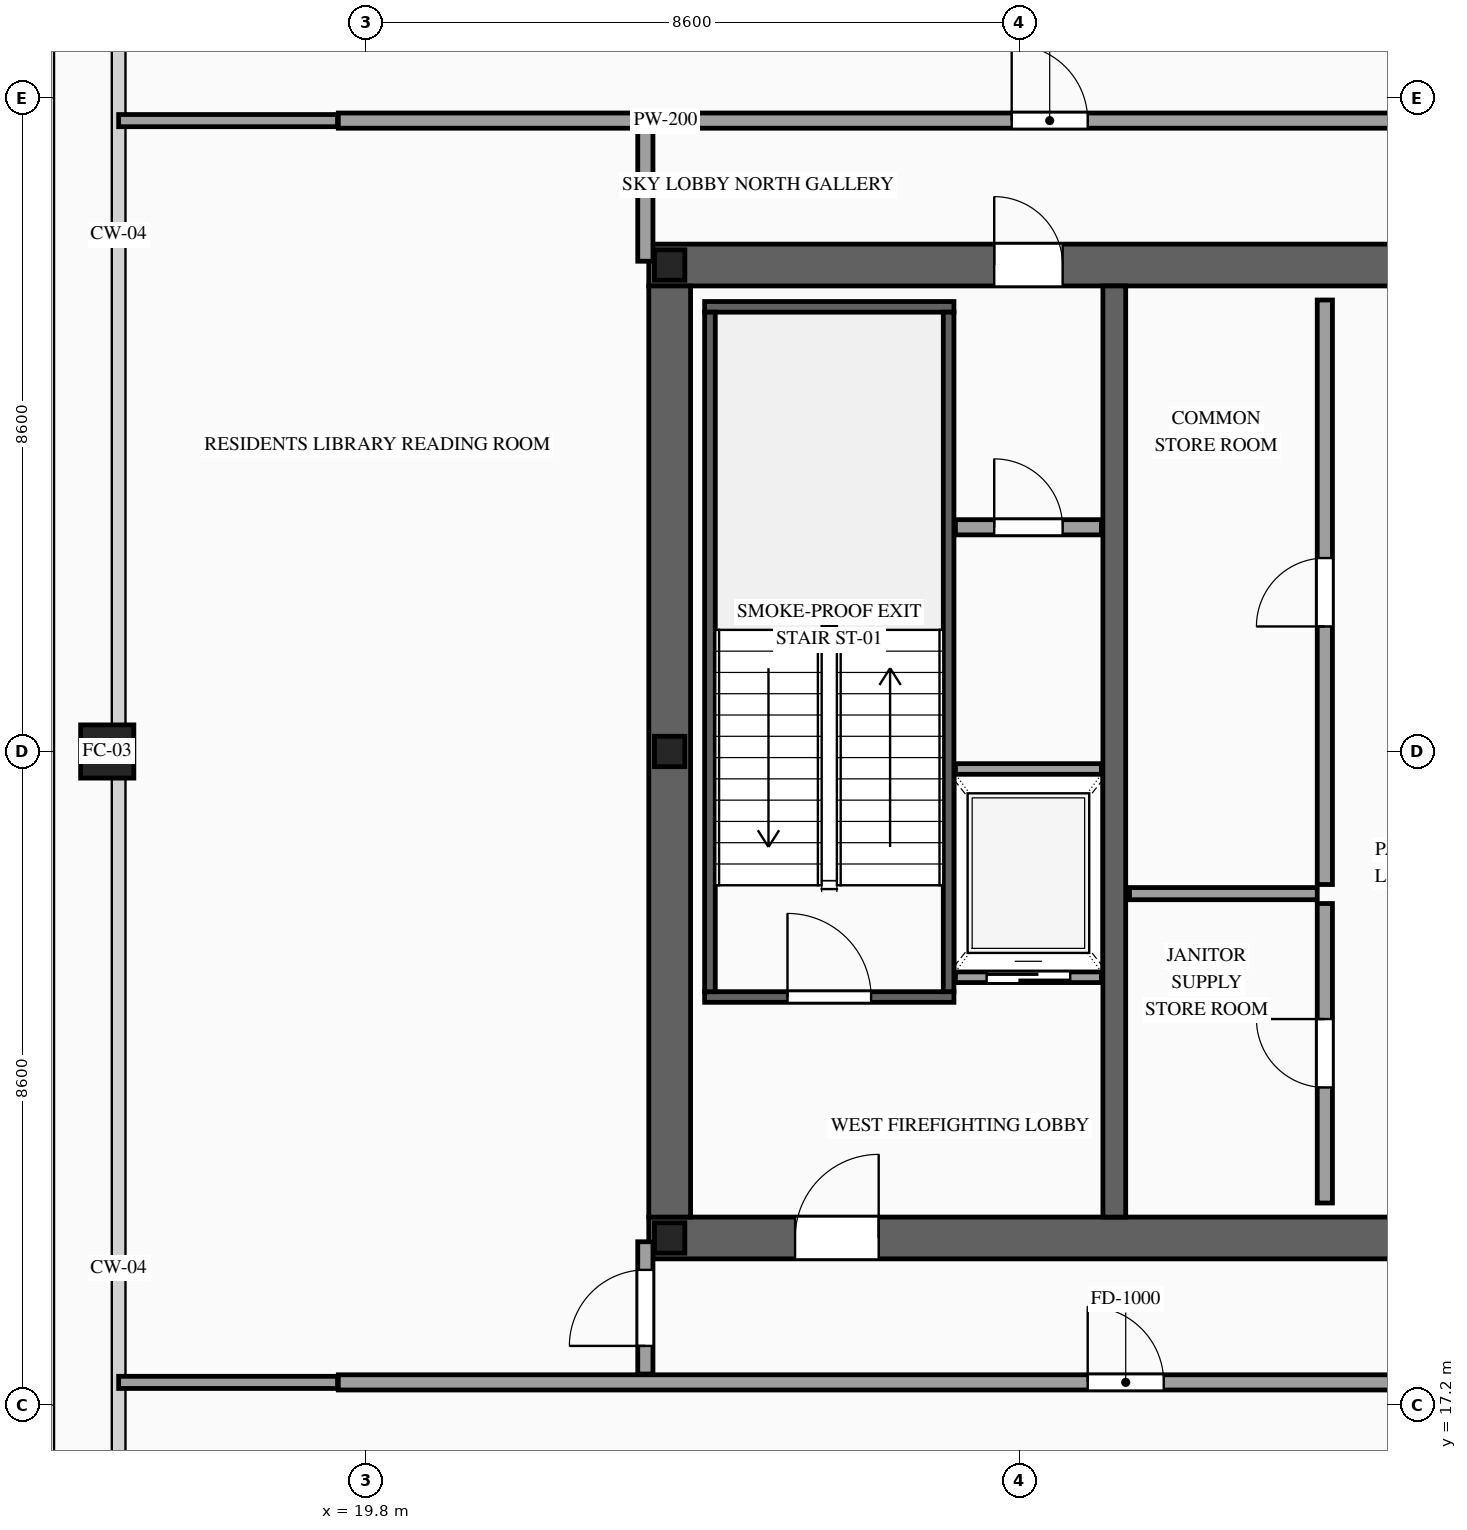
"""IFC4 building model, lengths in metres.
Left out: names, types, materials, properties, quantities, classifications, styles, units other than length and angle.
Written with IfcOpenShell. Run it as: python <this file> out.ifc"""

import sys

from ifc_helpers import new_model, si_unit, direction, frame, frame_2d, origin, origin_2d, place, context, subcontext, project, spatial, rectangle, hollow_rectangle, i_section, extrude, source, transform, mapped, element, fill, save


model = new_model("IFC4")
c1 = context("Model", 3, precision=1e-05, world=origin(), true_north=direction((0.0, 1.0)))
c2 = subcontext(c1, "Body", "Model", "MODEL_VIEW")
j1 = project(units=[si_unit("LENGTHUNIT", "METRE"), si_unit("PLANEANGLEUNIT", "RADIAN")], contexts=[c1])
p1 = place(None, origin())
s1 = spatial("IfcSite", under=j1, at=p1, CompositionType="ELEMENT")
p2 = place(p1, origin())
s2 = spatial("IfcBuilding", under=s1, at=p2, CompositionType="ELEMENT")
p3 = place(p2, frame((0.0, 0.0, 259.1)))
s3 = spatial("IfcBuildingStorey", under=s2, at=p3, CompositionType="ELEMENT", Elevation=259.1)
p4 = place(p3, frame((23.525, 19.4, 0.0), z_axis=(0.0, 0.0, 1.0), x_axis=(1.0, 0.0, 0.0)))
e1 = element("IfcWall", 1, at=p4, inside=s3, PredefinedType="SHEAR", context=c2, shape_type="SweptSolid", body=[
    extrude(rectangle(XDim=26.95, YDim=0.55, at=frame_2d((13.475, 0.0))), origin(), (0.0, 0.0, 1.0), 4.4),
])
p5 = place(p4, frame((1.925, 0.0, 0.0)))
e2 = element("IfcOpeningElement", 2, at=p5, cuts=e1, PredefinedType="OPENING", context=c2, shape_type="SweptSolid", body=[
    extrude(rectangle(XDim=1.1, YDim=2.2, at=frame_2d((0.55, 1.1))), frame((0.0, 0.29, 0.0), z_axis=(0.0, -1.0, 0.0), x_axis=(1.0, 0.0, 0.0)), (0.0, 0.0, 1.0), 0.58),
])
p6 = place(p4, frame((9.825, 0.0, 0.0)))
e3 = element("IfcOpeningElement", 3, at=p6, cuts=e1, PredefinedType="OPENING", context=c2, shape_type="SweptSolid", body=[
    extrude(rectangle(XDim=1.1, YDim=2.2, at=frame_2d((0.55, 1.1))), frame((0.0, 0.29, 0.0), z_axis=(0.0, -1.0, 0.0), x_axis=(1.0, 0.0, 0.0)), (0.0, 0.0, 1.0), 0.58),
])
p7 = place(p4, frame((23.025, 0.0, 0.0)))
e4 = element("IfcOpeningElement", 4, at=p7, cuts=e1, PredefinedType="OPENING", context=c2, shape_type="SweptSolid", body=[
    extrude(rectangle(XDim=1.1, YDim=2.2, at=frame_2d((0.55, 1.1))), frame((0.0, 0.29, 0.0), z_axis=(0.0, -1.0, 0.0), x_axis=(1.0, 0.0, 0.0)), (0.0, 0.0, 1.0), 0.58),
])
p8 = place(p4, frame((19.645, 0.0, 0.0)))
e5 = element("IfcOpeningElement", 5, at=p8, cuts=e1, PredefinedType="OPENING", context=c2, shape_type="SweptSolid", body=[
    extrude(rectangle(XDim=0.9, YDim=2.15, at=frame_2d((0.45, 1.075))), frame((0.0, 0.29, 0.0), z_axis=(0.0, -1.0, 0.0), x_axis=(1.0, 0.0, 0.0)), (0.0, 0.0, 1.0), 0.58),
])
p9 = place(p4, frame((18.205, 0.0, 0.0)))
e6 = element("IfcOpeningElement", 6, at=p9, cuts=e1, PredefinedType="OPENING", context=c2, shape_type="SweptSolid", body=[
    extrude(rectangle(XDim=0.9, YDim=2.15, at=frame_2d((0.45, 1.075))), frame((0.0, 0.29, 0.0), z_axis=(0.0, -1.0, 0.0), x_axis=(1.0, 0.0, 0.0)), (0.0, 0.0, 1.0), 0.58),
])
p10 = place(p3, frame((23.525, 32.2, 0.0), z_axis=(0.0, 0.0, 1.0), x_axis=(1.0, 0.0, 0.0)))
e7 = element("IfcWall", 7, at=p10, inside=s3, PredefinedType="SHEAR", context=c2, shape_type="SweptSolid", body=[
    extrude(rectangle(XDim=26.95, YDim=0.55, at=frame_2d((13.475, 0.0))), origin(), (0.0, 0.0, 1.0), 4.4),
])
p11 = place(p10, frame((4.545, 0.0, 0.0)))
e8 = element("IfcOpeningElement", 8, at=p11, cuts=e7, PredefinedType="OPENING", context=c2, shape_type="SweptSolid", body=[
    extrude(rectangle(XDim=0.9, YDim=2.15, at=frame_2d((0.45, 1.075))), frame((0.0, 0.29, 0.0), z_axis=(0.0, -1.0, 0.0), x_axis=(1.0, 0.0, 0.0)), (0.0, 0.0, 1.0), 0.58),
])
p12 = place(p10, frame((9.825, 0.0, 0.0)))
e9 = element("IfcOpeningElement", 9, at=p12, cuts=e7, PredefinedType="OPENING", context=c2, shape_type="SweptSolid", body=[
    extrude(rectangle(XDim=1.1, YDim=2.2, at=frame_2d((0.55, 1.1))), frame((0.0, 0.29, 0.0), z_axis=(0.0, -1.0, 0.0), x_axis=(1.0, 0.0, 0.0)), (0.0, 0.0, 1.0), 0.58),
])
p13 = place(p10, frame((15.675, 0.0, 0.0)))
e10 = element("IfcOpeningElement", 10, at=p13, cuts=e7, PredefinedType="OPENING", context=c2, shape_type="SweptSolid", body=[
    extrude(rectangle(XDim=1.1, YDim=2.2, at=frame_2d((0.55, 1.1))), frame((0.0, 0.29, 0.0), z_axis=(0.0, -1.0, 0.0), x_axis=(1.0, 0.0, 0.0)), (0.0, 0.0, 1.0), 0.58),
])
p14 = place(p10, frame((18.775, 0.0, 0.0)))
e11 = element("IfcOpeningElement", 11, at=p14, cuts=e7, PredefinedType="OPENING", context=c2, shape_type="SweptSolid", body=[
    extrude(rectangle(XDim=1.1, YDim=2.2, at=frame_2d((0.55, 1.1))), frame((0.0, 0.29, 0.0), z_axis=(0.0, -1.0, 0.0), x_axis=(1.0, 0.0, 0.0)), (0.0, 0.0, 1.0), 0.58),
])
m1 = source(origin(), c2, "Body", "SweptSolid", [
    extrude(rectangle(XDim=12.25, YDim=0.55, at=frame_2d((6.125, 0.0))), origin(), (0.0, 0.0, 1.0), 4.4),
])
p15 = place(p3, frame((23.8, 19.675, 0.0), z_axis=(0.0, 0.0, 1.0), x_axis=(0.0, 1.0, 0.0)))
e12 = element("IfcWall", 12, at=p15, inside=s3, PredefinedType="SHEAR", context=c2, shape_type="MappedRepresentation", body=[
    mapped(m1, transform((0.0, 0.0, 0.0), scale=1.0)),
])
m2 = source(origin(), c2, "Body", "SweptSolid", [
    extrude(rectangle(XDim=12.25, YDim=0.3, at=frame_2d((6.125, 0.0))), origin(), (0.0, 0.0, 1.0), 4.4),
])
p16 = place(p3, frame((29.65, 19.675, 0.0), z_axis=(0.0, 0.0, 1.0), x_axis=(0.0, 1.0, 0.0)))
e13 = element("IfcWall", 13, at=p16, inside=s3, PredefinedType="SOLIDWALL", context=c2, shape_type="MappedRepresentation", body=[
    mapped(m2, transform((0.0, 0.0, 0.0), scale=1.0)),
])
m3 = source(origin(), c2, "Body", "SweptSolid", [
    extrude(i_section(OverallWidth=0.4, OverallDepth=0.4, WebThickness=0.013, FlangeThickness=0.021, at=origin_2d()), origin(), (0.0, 0.0, 1.0), 4.4),
])
for number, where, z_axis, x_axis in (
    (14, (23.8, 19.4, 0.0), (0.0, 0.0, 1.0), (1.0, 0.0, 0.0)),
    (15, (23.8, 25.8, 0.0), (0.0, 0.0, 1.0), (1.0, 0.0, 0.0)),
    (16, (23.8, 32.2, 0.0), (0.0, 0.0, 1.0), (1.0, 0.0, 0.0)),
):
    element("IfcColumn", number, at=place(p3, frame(where, z_axis=z_axis, x_axis=x_axis)), inside=s3, PredefinedType="COLUMN", context=c2, shape_type="MappedRepresentation", body=[
        mapped(m3, transform((0.0, 0.0, 0.0), scale=1.0)),
    ])
m4 = source(origin(), c2, "Body", "SweptSolid", [
    extrude(hollow_rectangle(XDim=0.7, YDim=0.7, WallThickness=0.032, at=origin_2d()), origin(), (0.0, 0.0, 1.0), 4.4),
])
p17 = place(p3, frame((16.4, 25.8, 0.0), z_axis=(0.0, 0.0, 1.0), x_axis=(1.0, 0.0, 0.0)))
e17 = element("IfcColumn", 17, at=p17, inside=s3, PredefinedType="COLUMN", context=c2, shape_type="MappedRepresentation", body=[
    mapped(m4, transform((0.0, 0.0, 0.0), scale=1.0)),
])
p18 = place(p3, frame((27.56, 22.83, 0.0), z_axis=(0.0, 0.0, 1.0), x_axis=(1.0, 0.0, 0.0)))
e18 = element("IfcWall", 18, at=p18, inside=s3, PredefinedType="SOLIDWALL", context=c2, shape_type="SweptSolid", body=[
    extrude(rectangle(XDim=1.92, YDim=0.14, at=frame_2d((0.96, 0.0))), origin(), (0.0, 0.0, 1.0), 4.12),
])
p19 = place(p18, frame((0.41, 0.0, 0.0)))
e19 = element("IfcOpeningElement", 19, at=p19, cuts=e18, PredefinedType="OPENING", context=c2, shape_type="SweptSolid", body=[
    extrude(rectangle(XDim=1.1, YDim=2.2, at=frame_2d((0.55, 1.1))), frame((0.0, 0.085, 0.0), z_axis=(0.0, -1.0, 0.0), x_axis=(1.0, 0.0, 0.0)), (0.0, 0.0, 1.0), 0.17),
])
m5 = source(origin(), c2, "Body", "SweptSolid", [
    extrude(rectangle(XDim=1.92, YDim=0.14, at=frame_2d((0.96, 0.0))), origin(), (0.0, 0.0, 1.0), 4.12),
])
p20 = place(p3, frame((27.56, 25.57, 0.0), z_axis=(0.0, 0.0, 1.0), x_axis=(1.0, 0.0, 0.0)))
e20 = element("IfcWall", 20, at=p20, inside=s3, PredefinedType="SOLIDWALL", context=c2, shape_type="MappedRepresentation", body=[
    mapped(m5, transform((0.0, 0.0, 0.0), scale=1.0)),
])
p21 = place(p3, frame((24.26, 22.57, 0.0), z_axis=(0.0, 0.0, 1.0), x_axis=(1.0, 0.0, 0.0)))
e21 = element("IfcWall", 21, at=p21, inside=s3, PredefinedType="SOLIDWALL", context=c2, shape_type="SweptSolid", body=[
    extrude(rectangle(XDim=3.28, YDim=0.14, at=frame_2d((1.64, 0.0))), origin(), (0.0, 0.0, 1.0), 4.12),
])
p22 = place(p21, frame((1.09, 0.0, 0.0)))
e22 = element("IfcOpeningElement", 22, at=p22, cuts=e21, PredefinedType="OPENING", context=c2, shape_type="SweptSolid", body=[
    extrude(rectangle(XDim=1.1, YDim=2.2, at=frame_2d((0.55, 1.1))), frame((0.0, 0.085, 0.0), z_axis=(0.0, -1.0, 0.0), x_axis=(1.0, 0.0, 0.0)), (0.0, 0.0, 1.0), 0.17),
])
m6 = source(origin(), c2, "Body", "SweptSolid", [
    extrude(rectangle(XDim=3.28, YDim=0.14, at=frame_2d((1.64, 0.0))), origin(), (0.0, 0.0, 1.0), 4.12),
])
p23 = place(p3, frame((24.26, 31.65, 0.0), z_axis=(0.0, 0.0, 1.0), x_axis=(1.0, 0.0, 0.0)))
e23 = element("IfcWall", 23, at=p23, inside=s3, PredefinedType="SOLIDWALL", context=c2, shape_type="MappedRepresentation", body=[
    mapped(m6, transform((0.0, 0.0, 0.0), scale=1.0)),
])
m7 = source(origin(), c2, "Body", "SweptSolid", [
    extrude(rectangle(XDim=8.94, YDim=0.14, at=frame_2d((4.47, 0.0))), origin(), (0.0, 0.0, 1.0), 4.12),
])
for number, where, z_axis, x_axis in (
    (24, (24.33, 22.64, 0.0), (0.0, 0.0, 1.0), (0.0, 1.0, 0.0)),
    (25, (27.47, 22.64, 0.0), (0.0, 0.0, 1.0), (0.0, 1.0, 0.0)),
):
    element("IfcWall", number, at=place(p3, frame(where, z_axis=z_axis, x_axis=x_axis)), inside=s3, PredefinedType="SOLIDWALL", context=c2, shape_type="MappedRepresentation", body=[
        mapped(m7, transform((0.0, 0.0, 0.0), scale=1.0)),
    ])
p24 = place(p3, frame((27.56, 28.75, 0.0), z_axis=(0.0, 0.0, 1.0), x_axis=(1.0, 0.0, 0.0)))
e26 = element("IfcWall", 26, at=p24, inside=s3, PredefinedType="PARTITIONING", context=c2, shape_type="SweptSolid", body=[
    extrude(rectangle(XDim=1.92, YDim=0.2, at=frame_2d((0.96, 0.0))), origin(), (0.0, 0.0, 1.0), 4.12),
])
p25 = place(p24, frame((0.51, 0.0, 0.0)))
e27 = element("IfcOpeningElement", 27, at=p25, cuts=e26, PredefinedType="OPENING", context=c2, shape_type="SweptSolid", body=[
    extrude(rectangle(XDim=0.9, YDim=2.15, at=frame_2d((0.45, 1.075))), frame((0.0, 0.115, 0.0), z_axis=(0.0, -1.0, 0.0), x_axis=(1.0, 0.0, 0.0)), (0.0, 0.0, 1.0), 0.23),
])
p26 = place(p3, frame((32.42, 19.86, 0.0), z_axis=(0.0, 0.0, 1.0), x_axis=(0.0, 1.0, 0.0)))
e28 = element("IfcWall", 28, at=p26, inside=s3, PredefinedType="PARTITIONING", context=c2, shape_type="SweptSolid", body=[
    extrude(rectangle(XDim=3.94, YDim=0.2, at=frame_2d((1.97, 0.0))), origin(), (0.0, 0.0, 1.0), 4.12),
])
p27 = place(p26, frame((1.52, 0.0, 0.0)))
e29 = element("IfcOpeningElement", 29, at=p27, cuts=e28, PredefinedType="OPENING", context=c2, shape_type="SweptSolid", body=[
    extrude(rectangle(XDim=0.9, YDim=2.15, at=frame_2d((0.45, 1.075))), frame((0.0, 0.115, 0.0), z_axis=(0.0, -1.0, 0.0), x_axis=(1.0, 0.0, 0.0)), (0.0, 0.0, 1.0), 0.23),
])
p28 = place(p3, frame((32.42, 24.05, 0.0), z_axis=(0.0, 0.0, 1.0), x_axis=(0.0, 1.0, 0.0)))
e30 = element("IfcWall", 30, at=p28, inside=s3, PredefinedType="PARTITIONING", context=c2, shape_type="SweptSolid", body=[
    extrude(rectangle(XDim=7.69, YDim=0.2, at=frame_2d((3.845, 0.0))), origin(), (0.0, 0.0, 1.0), 4.12),
])
p29 = place(p28, frame((3.395, 0.0, 0.0)))
e31 = element("IfcOpeningElement", 31, at=p29, cuts=e30, PredefinedType="OPENING", context=c2, shape_type="SweptSolid", body=[
    extrude(rectangle(XDim=0.9, YDim=2.15, at=frame_2d((0.45, 1.075))), frame((0.0, 0.115, 0.0), z_axis=(0.0, -1.0, 0.0), x_axis=(1.0, 0.0, 0.0)), (0.0, 0.0, 1.0), 0.23),
])
m8 = source(origin(), c2, "Body", "SweptSolid", [
    extrude(rectangle(XDim=2.47, YDim=0.16, at=frame_2d((1.235, 0.0))), origin(), (0.0, 0.0, 1.0), 4.12),
])
p30 = place(p3, frame((29.85, 23.93, 0.0), z_axis=(0.0, 0.0, 1.0), x_axis=(1.0, 0.0, 0.0)))
e32 = element("IfcWall", 32, at=p30, inside=s3, PredefinedType="PARTITIONING", context=c2, shape_type="MappedRepresentation", body=[
    mapped(m8, transform((0.0, 0.0, 0.0), scale=1.0)),
])
p31 = place(p3, frame((19.44, 17.5, 0.0), z_axis=(0.0, 0.0, 1.0), x_axis=(1.0, 0.0, 0.0)))
e33 = element("IfcWall", 33, at=p31, inside=s3, PredefinedType="PARTITIONING", context=c2, shape_type="SweptSolid", body=[
    extrude(rectangle(XDim=17.36, YDim=0.2, at=frame_2d((8.68, 0.0))), origin(), (0.0, 0.0, 1.0), 4.12),
])
p32 = place(p31, frame((9.86, 0.0, 0.0)))
e34 = element("IfcOpeningElement", 34, at=p32, cuts=e33, PredefinedType="OPENING", context=c2, shape_type="SweptSolid", body=[
    extrude(rectangle(XDim=1.0, YDim=2.2, at=frame_2d((0.5, 1.1))), frame((0.0, 0.115, 0.0), z_axis=(0.0, -1.0, 0.0), x_axis=(1.0, 0.0, 0.0)), (0.0, 0.0, 1.0), 0.23),
])
p33 = place(p3, frame((23.48, 17.61, 0.0), z_axis=(0.0, 0.0, 1.0), x_axis=(0.0, 1.0, 0.0)))
e35 = element("IfcWall", 35, at=p33, inside=s3, PredefinedType="PARTITIONING", context=c2, shape_type="SweptSolid", body=[
    extrude(rectangle(XDim=1.74, YDim=0.2, at=frame_2d((0.87, 0.0))), origin(), (0.0, 0.0, 1.0), 4.12),
])
p34 = place(p33, frame((0.37, 0.0, 0.0)))
e36 = element("IfcOpeningElement", 36, at=p34, cuts=e35, PredefinedType="OPENING", context=c2, shape_type="SweptSolid", body=[
    extrude(rectangle(XDim=1.0, YDim=2.2, at=frame_2d((0.5, 1.1))), frame((0.0, 0.115, 0.0), z_axis=(0.0, -1.0, 0.0), x_axis=(1.0, 0.0, 0.0)), (0.0, 0.0, 1.0), 0.23),
])
m9 = source(origin(), c2, "Body", "SweptSolid", [
    extrude(rectangle(XDim=1.74, YDim=0.2, at=frame_2d((0.87, 0.0))), origin(), (0.0, 0.0, 1.0), 4.12),
])
p35 = place(p3, frame((23.48, 32.25, 0.0), z_axis=(0.0, 0.0, 1.0), x_axis=(0.0, 1.0, 0.0)))
e37 = element("IfcWall", 37, at=p35, inside=s3, PredefinedType="PARTITIONING", context=c2, shape_type="MappedRepresentation", body=[
    mapped(m9, transform((0.0, 0.0, 0.0), scale=1.0)),
])
m10 = source(origin(), c2, "Body", "SweptSolid", [
    extrude(rectangle(XDim=2.88, YDim=0.16, at=frame_2d((1.44, 0.0))), origin(), (0.0, 0.0, 1.0), 4.12),
])
for number, where, z_axis, x_axis in (
    (38, (16.55, 17.5, 0.0), (0.0, 0.0, 1.0), (1.0, 0.0, 0.0)),
    (39, (16.55, 34.1, 0.0), (0.0, 0.0, 1.0), (1.0, 0.0, 0.0)),
):
    element("IfcWall", number, at=place(p3, frame(where, z_axis=z_axis, x_axis=x_axis)), inside=s3, PredefinedType="PARTITIONING", context=c2, shape_type="MappedRepresentation", body=[
        mapped(m10, transform((0.0, 0.0, 0.0), scale=1.0)),
    ])
p36 = place(p3, frame((19.44, 34.1, 0.0), z_axis=(0.0, 0.0, 1.0), x_axis=(1.0, 0.0, 0.0)))
e40 = element("IfcWall", 40, at=p36, inside=s3, PredefinedType="PARTITIONING", context=c2, shape_type="SweptSolid", body=[
    extrude(rectangle(XDim=14.56, YDim=0.2, at=frame_2d((7.28, 0.0))), origin(), (0.0, 0.0, 1.0), 4.12),
])
p37 = place(p36, frame((8.86, 0.0, 0.0)))
e41 = element("IfcOpeningElement", 41, at=p37, cuts=e40, PredefinedType="OPENING", context=c2, shape_type="SweptSolid", body=[
    extrude(rectangle(XDim=1.0, YDim=2.2, at=frame_2d((0.5, 1.1))), frame((0.0, 0.115, 0.0), z_axis=(0.0, -1.0, 0.0), x_axis=(1.0, 0.0, 0.0)), (0.0, 0.0, 1.0), 0.23),
])
m11 = source(origin(), c2, "Body", "SweptSolid", [
    extrude(rectangle(XDim=1.1, YDim=2.2, at=frame_2d((0.55, 1.1))), frame((0.0, 0.025, 0.0), z_axis=(0.0, -1.0, 0.0), x_axis=(1.0, 0.0, 0.0)), (0.0, 0.0, 1.0), 0.05),
])
p38 = place(p19, origin())
e42 = element("IfcDoor", 42, at=p38, inside=s3, OperationType="SLIDING_TO_LEFT", PredefinedType="DOOR", context=c2, shape_type="MappedRepresentation", body=[
    mapped(m11, transform((0.0, 0.0, 0.0), scale=1.0)),
])
fill(e19, e42)
m12 = source(origin(), c2, "Body", "SweptSolid", [
    extrude(rectangle(XDim=1.1, YDim=2.2, at=frame_2d((0.55, 1.1))), frame((0.0, 0.025, 0.0), z_axis=(0.0, -1.0, 0.0), x_axis=(1.0, 0.0, 0.0)), (0.0, 0.0, 1.0), 0.05),
])
p39 = place(p22, origin())
e43 = element("IfcDoor", 43, at=p39, inside=s3, OperationType="SINGLE_SWING_LEFT", PredefinedType="DOOR", context=c2, shape_type="MappedRepresentation", body=[
    mapped(m12, transform((0.0, 0.0, 0.0), scale=1.0)),
])
fill(e22, e43)
p40 = place(p5, origin())
e44 = element("IfcDoor", 44, at=p40, inside=s3, OperationType="SINGLE_SWING_RIGHT", PredefinedType="DOOR", context=c2, shape_type="MappedRepresentation", body=[
    mapped(m12, transform((0.0, 0.0, 0.0), scale=1.0)),
])
fill(e2, e44)
m13 = source(origin(), c2, "Body", "SweptSolid", [
    extrude(rectangle(XDim=0.9, YDim=2.15, at=frame_2d((0.45, 1.075))), frame((0.0, 0.025, 0.0), z_axis=(0.0, -1.0, 0.0), x_axis=(1.0, 0.0, 0.0)), (0.0, 0.0, 1.0), 0.05),
])
p41 = place(p11, origin())
e45 = element("IfcDoor", 45, at=p41, inside=s3, OperationType="SINGLE_SWING_LEFT", PredefinedType="DOOR", context=c2, shape_type="MappedRepresentation", body=[
    mapped(m13, transform((0.0, 0.0, 0.0), scale=1.0)),
])
fill(e8, e45)
p42 = place(p25, origin())
e46 = element("IfcDoor", 46, at=p42, inside=s3, OperationType="SINGLE_SWING_LEFT", PredefinedType="DOOR", context=c2, shape_type="MappedRepresentation", body=[
    mapped(m13, transform((0.0, 0.0, 0.0), scale=1.0)),
])
fill(e27, e46)
p43 = place(p27, origin())
e47 = element("IfcDoor", 47, at=p43, inside=s3, OperationType="SINGLE_SWING_RIGHT", PredefinedType="DOOR", context=c2, shape_type="MappedRepresentation", body=[
    mapped(m13, transform((0.0, 0.0, 0.0), scale=1.0)),
])
fill(e29, e47)
p44 = place(p29, origin())
e48 = element("IfcDoor", 48, at=p44, inside=s3, OperationType="SINGLE_SWING_LEFT", PredefinedType="DOOR", context=c2, shape_type="MappedRepresentation", body=[
    mapped(m13, transform((0.0, 0.0, 0.0), scale=1.0)),
])
fill(e31, e48)
m14 = source(origin(), c2, "Body", "SweptSolid", [
    extrude(rectangle(XDim=1.0, YDim=2.2, at=frame_2d((0.5, 1.1))), frame((0.0, 0.025, 0.0), z_axis=(0.0, -1.0, 0.0), x_axis=(1.0, 0.0, 0.0)), (0.0, 0.0, 1.0), 0.05),
])
p45 = place(p32, origin())
e49 = element("IfcDoor", 49, at=p45, inside=s3, OperationType="SINGLE_SWING_LEFT", PredefinedType="DOOR", context=c2, shape_type="MappedRepresentation", body=[
    mapped(m14, transform((0.0, 0.0, 0.0), scale=1.0)),
])
fill(e34, e49)
p46 = place(p34, origin())
e50 = element("IfcDoor", 50, at=p46, inside=s3, OperationType="SINGLE_SWING_LEFT", PredefinedType="DOOR", context=c2, shape_type="MappedRepresentation", body=[
    mapped(m14, transform((0.0, 0.0, 0.0), scale=1.0)),
])
fill(e36, e50)
p47 = place(p37, origin())
e51 = element("IfcDoor", 51, at=p47, inside=s3, OperationType="SINGLE_SWING_LEFT", PredefinedType="DOOR", context=c2, shape_type="MappedRepresentation", body=[
    mapped(m14, transform((0.0, 0.0, 0.0), scale=1.0)),
])
fill(e41, e51)
save(model, sys.argv[1])
